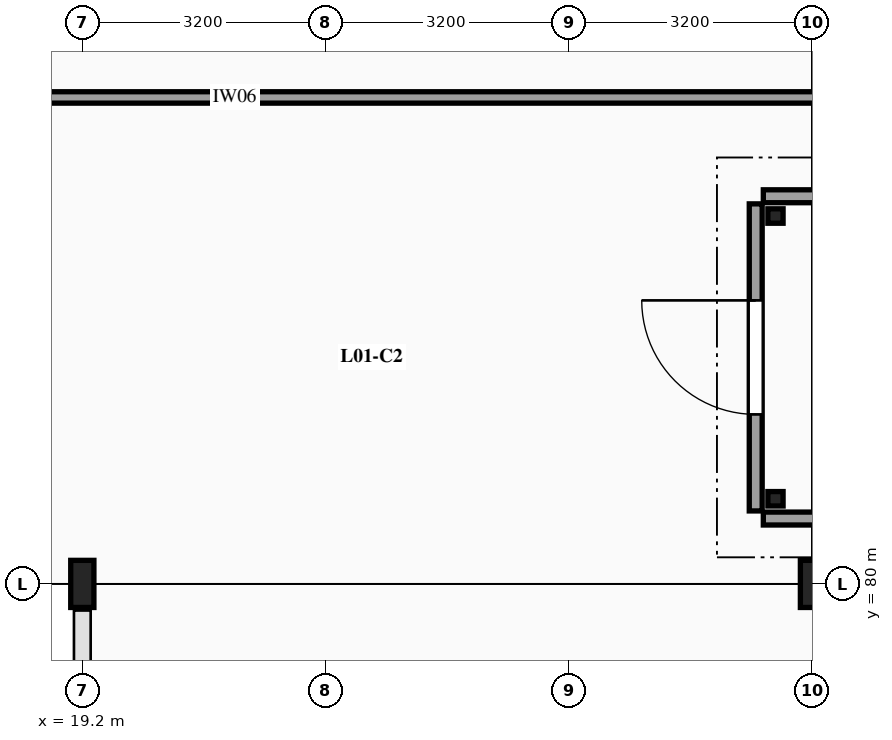
"""IFC4 building model, lengths in metres.
Left out: names, types, materials, properties, quantities, classifications, styles, units other than length and angle.
Written with IfcOpenShell. Run it as: python <this file> out.ifc"""

import sys

from ifc_helpers import new_model, si_unit, direction, frame, frame_2d, origin, origin_2d, place, context, subcontext, project, spatial, rectangle, i_section, extrude, element, fill, save


model = new_model("IFC4")
c1 = context("Model", 3, precision=1e-05, world=origin(), true_north=direction((0.0, 1.0)))
c2 = subcontext(c1, "Body", "Model", "MODEL_VIEW")
j1 = project(units=[si_unit("LENGTHUNIT", "METRE"), si_unit("PLANEANGLEUNIT", "RADIAN")], contexts=[c1])
p1 = place(None, origin())
s1 = spatial("IfcSite", under=j1, at=p1, CompositionType="ELEMENT")
p2 = place(p1, origin())
s2 = spatial("IfcBuilding", under=s1, at=p2, CompositionType="ELEMENT")
p3 = place(p2, frame((0.0, 0.0, 4.5)))
s3 = spatial("IfcBuildingStorey", under=s2, at=p3, CompositionType="ELEMENT", Elevation=4.5)
for number, where, z_axis, x_axis in (
    (1, (19.2, 80.0, -0.26), (0.0, 0.0, 1.0), (1.0, 0.0, 0.0)),
    (2, (28.8, 80.0, -0.26), (0.0, 0.0, 1.0), (1.0, 0.0, 0.0)),
):
    element("IfcColumn", number, at=place(p3, frame(where, z_axis=z_axis, x_axis=x_axis)), inside=s3, PredefinedType="COLUMN", context=c2, shape_type="SweptSolid", body=[
        extrude(i_section(OverallWidth=0.305, OverallDepth=0.62, WebThickness=0.021, FlangeThickness=0.04, FilletRadius=0.027, at=origin_2d()), origin(), (0.0, 0.0, 1.0), 4.2),
    ])
for number, where, z_axis, x_axis in (
    (3, (28.32, 81.12, 0.0), (0.0, 0.0, 1.0), (1.0, 0.0, 0.0)),
    (4, (28.32, 84.84, 0.0), (0.0, 0.0, 1.0), (1.0, 0.0, 0.0)),
):
    element("IfcColumn", number, at=place(p3, frame(where, z_axis=z_axis, x_axis=x_axis)), inside=s3, PredefinedType="COLUMN", context=c2, shape_type="SweptSolid", body=[
        extrude(i_section(OverallWidth=0.2, OverallDepth=0.19, WebThickness=0.007, FlangeThickness=0.01, FilletRadius=0.018, at=origin_2d()), origin(), (0.0, 0.0, 1.0), 4.2),
    ])
p4 = place(p3, frame((28.06, 80.96, 0.0), z_axis=(0.0, 0.0, 1.0), x_axis=(0.0, 1.0, 0.0)))
e5 = element("IfcWall", 5, at=p4, inside=s3, PredefinedType="SOLIDWALL", context=c2, shape_type="SweptSolid", body=[
    extrude(rectangle(XDim=4.04, YDim=0.17, at=frame_2d((2.02, 0.0))), origin(), (0.0, 0.0, 1.0), 3.1),
])
p5 = place(p4, frame((1.27, 0.0, 0.0)))
e6 = element("IfcOpeningElement", 6, at=p5, cuts=e5, PredefinedType="OPENING", context=c2, shape_type="SweptSolid", body=[
    extrude(rectangle(XDim=1.5, YDim=2.2, at=frame_2d((0.75, 1.1))), frame((0.0, 0.095, 0.0), z_axis=(0.0, -1.0, 0.0), x_axis=(1.0, 0.0, 0.0)), (0.0, 0.0, 1.0), 0.19),
])
for number, where, z_axis, x_axis in (
    (7, (28.16, 80.86, 0.0), (0.0, 0.0, 1.0), (1.0, 0.0, 0.0)),
    (8, (28.16, 85.1, 0.0), (0.0, 0.0, 1.0), (1.0, 0.0, 0.0)),
):
    element("IfcWall", number, at=place(p3, frame(where, z_axis=z_axis, x_axis=x_axis)), inside=s3, PredefinedType="SOLIDWALL", context=c2, shape_type="SweptSolid", body=[
        extrude(rectangle(XDim=10.0, YDim=0.17, at=frame_2d((5.0, 0.0))), origin(), (0.0, 0.0, 1.0), 3.1),
    ])
p6 = place(p3, frame((10.14, 86.4, 0.0), z_axis=(0.0, 0.0, 1.0), x_axis=(1.0, 0.0, 0.0)))
e9 = element("IfcWall", 9, at=p6, inside=s3, PredefinedType="PARTITIONING", context=c2, shape_type="SweptSolid", body=[
    extrude(rectangle(XDim=27.72, YDim=0.15, at=frame_2d((13.86, 0.0))), origin(), (0.0, 0.0, 1.0), 3.1),
])
p7 = place(p6, frame((22.378, 0.0, 0.0)))
e10 = element("IfcOpeningElement", 10, at=p7, cuts=e9, PredefinedType="OPENING", context=c2, shape_type="SweptSolid", body=[
    extrude(rectangle(XDim=2.0, YDim=2.6, at=frame_2d((1.0, 1.3))), frame((0.0, 0.085, 0.0), z_axis=(0.0, -1.0, 0.0), x_axis=(1.0, 0.0, 0.0)), (0.0, 0.0, 1.0), 0.17),
])
p8 = place(p5, origin())
e11 = element("IfcDoor", 11, at=p8, inside=s3, OperationType="SINGLE_SWING_RIGHT", PredefinedType="DOOR", context=c2, shape_type="SweptSolid", body=[
    extrude(rectangle(XDim=1.5, YDim=2.2, at=frame_2d((0.75, 1.1))), frame((0.0, 0.025, 0.0), z_axis=(0.0, -1.0, 0.0), x_axis=(1.0, 0.0, 0.0)), (0.0, 0.0, 1.0), 0.05),
])
fill(e6, e11)
save(model, sys.argv[1])
